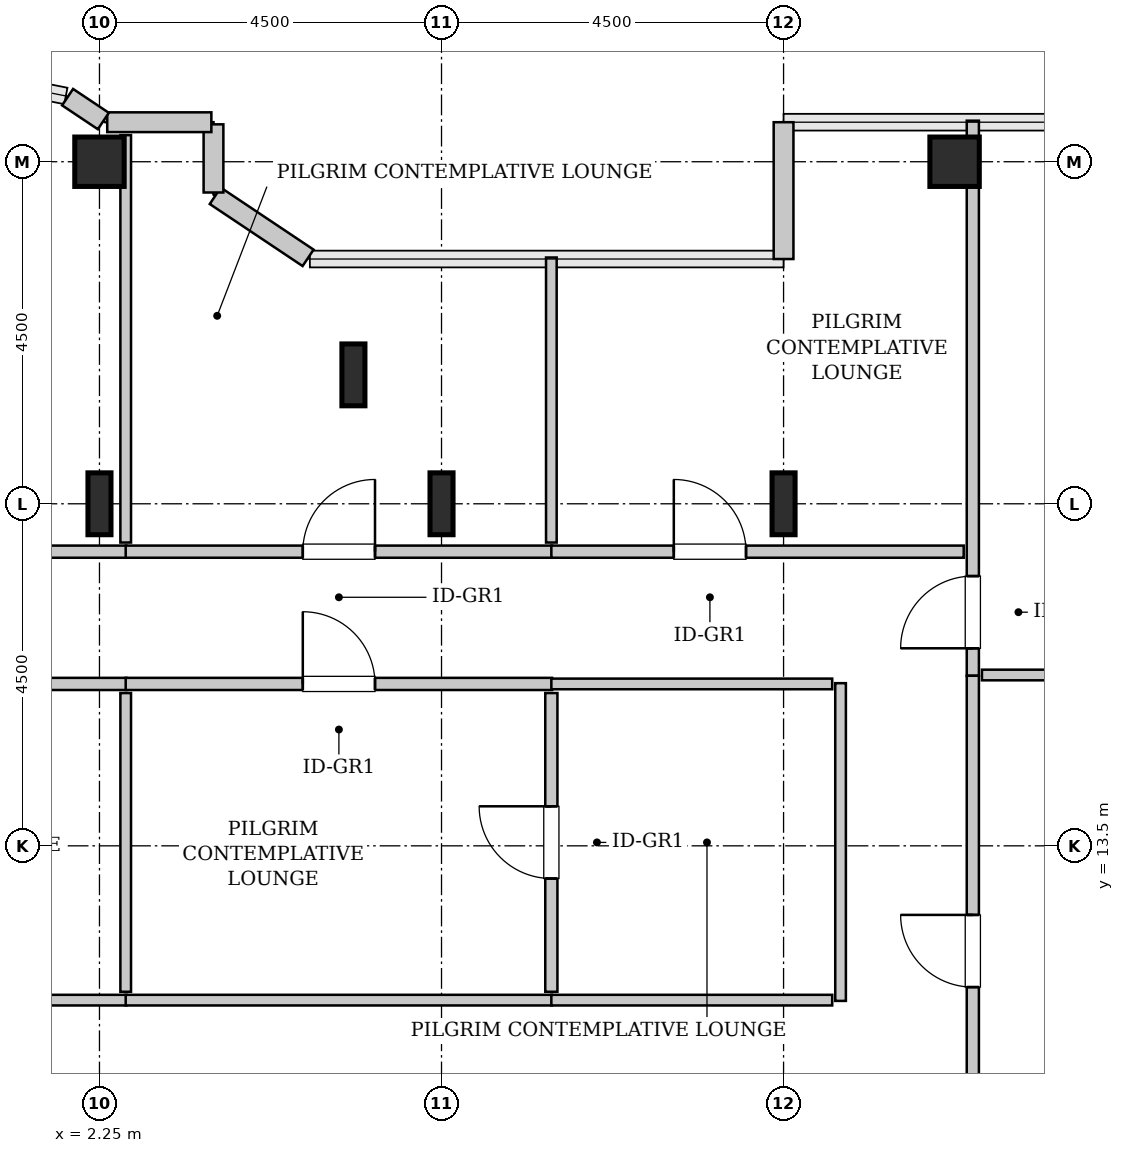
"""IFC4 building model, lengths in metres.
Left out: names, types, materials, properties, quantities, classifications, styles, units other than length and angle.
Written with IfcOpenShell. Run it as: python <this file> out.ifc"""

import sys

from ifc_helpers import new_model, si_unit, direction, frame, frame_2d, origin, origin_2d, place, context, subcontext, project, spatial, rectangle, hollow_rectangle, i_section, extrude, source, transform, mapped, element, fill, save


model = new_model("IFC4")
c1 = context("Model", 3, precision=1e-05, world=origin(), true_north=direction((0.0, 1.0)))
c2 = subcontext(c1, "Body", "Model", "MODEL_VIEW")
j1 = project(units=[si_unit("LENGTHUNIT", "METRE"), si_unit("PLANEANGLEUNIT", "RADIAN")], contexts=[c1])
p1 = place(None, origin())
s1 = spatial("IfcSite", under=j1, at=p1, CompositionType="ELEMENT")
p2 = place(p1, origin())
s2 = spatial("IfcBuilding", under=s1, at=p2, CompositionType="ELEMENT")
p3 = place(p2, frame((0.0, 0.0, 252.2)))
s3 = spatial("IfcBuildingStorey", under=s2, at=p3, CompositionType="ELEMENT", Elevation=252.2)
m1 = source(origin(), c2, "Body", "SweptSolid", [
    extrude(i_section(OverallWidth=0.303, OverallDepth=0.814, WebThickness=0.021, FlangeThickness=0.04, FilletRadius=0.03, at=origin_2d()), origin(), (0.0, 0.0, 1.0), 3.8),
])
p4 = place(p3, frame((2.25, 18.0, 0.0), z_axis=(0.0, 0.0, 1.0), x_axis=(1.0, 0.0, 0.0)))
e1 = element("IfcColumn", 1, at=p4, inside=s3, PredefinedType="COLUMN", context=c2, shape_type="MappedRepresentation", body=[
    mapped(m1, transform((0.0, 0.0, 0.0), x_axis=(1.0, 0.0, 0.0), y_axis=(0.0, 1.0, 0.0), z_axis=(0.0, 0.0, 1.0), scale=1.0)),
])
m2 = source(origin(), c2, "Body", "SweptSolid", [
    extrude(hollow_rectangle(XDim=0.65, YDim=0.65, WallThickness=0.032, InnerFilletRadius=0.032, OuterFilletRadius=0.064, at=origin_2d()), origin(), (0.0, 0.0, 1.0), 3.8),
])
p5 = place(p3, frame((2.25, 22.5, 0.0), z_axis=(0.0, 0.0, 1.0), x_axis=(1.0, 0.0, 0.0)))
e2 = element("IfcColumn", 2, at=p5, inside=s3, PredefinedType="COLUMN", context=c2, shape_type="MappedRepresentation", body=[
    mapped(m2, transform((0.0, 0.0, 0.0), x_axis=(1.0, 0.0, 0.0), y_axis=(0.0, 1.0, 0.0), z_axis=(0.0, 0.0, 1.0), scale=1.0)),
])
for number, where, z_axis, x_axis in (
    (3, (5.591, 19.696, 0.0), (0.0, 0.0, 1.0), (1.0, 0.0, 0.0)),
    (4, (6.75, 18.0, 0.0), (0.0, 0.0, 1.0), (1.0, 0.0, 0.0)),
    (5, (11.25, 18.0, 0.0), (0.0, 0.0, 1.0), (1.0, 0.0, 0.0)),
):
    element("IfcColumn", number, at=place(p3, frame(where, z_axis=z_axis, x_axis=x_axis)), inside=s3, PredefinedType="COLUMN", context=c2, shape_type="MappedRepresentation", body=[
        mapped(m1, transform((0.0, 0.0, 0.0), x_axis=(1.0, 0.0, 0.0), y_axis=(0.0, 1.0, 0.0), z_axis=(0.0, 0.0, 1.0), scale=1.0)),
    ])
p6 = place(p3, frame((13.5, 22.5, 0.0), z_axis=(0.0, 0.0, 1.0), x_axis=(1.0, 0.0, 0.0)))
e6 = element("IfcColumn", 6, at=p6, inside=s3, PredefinedType="COLUMN", context=c2, shape_type="MappedRepresentation", body=[
    mapped(m2, transform((0.0, 0.0, 0.0), x_axis=(1.0, 0.0, 0.0), y_axis=(0.0, 1.0, 0.0), z_axis=(0.0, 0.0, 1.0), scale=1.0)),
])
m3 = source(origin(), c2, "Body", "SweptSolid", [
    extrude(rectangle(XDim=1.8, YDim=0.26, at=frame_2d((0.9, 0.0))), origin(), (0.0, 0.0, 1.0), 3.55),
])
p7 = place(p3, frame((11.25, 23.02, 0.0), z_axis=(0.0, 0.0, 1.0), x_axis=(0.0, -1.0, 0.0)))
e7 = element("IfcWall", 7, at=p7, inside=s3, PredefinedType="SOLIDWALL", context=c2, shape_type="MappedRepresentation", body=[
    mapped(m3, transform((0.0, 0.0, 0.0), x_axis=(1.0, 0.0, 0.0), y_axis=(0.0, 1.0, 0.0), z_axis=(0.0, 0.0, 1.0), scale=1.0)),
])
m4 = source(origin(), c2, "Body", "SweptSolid", [
    extrude(rectangle(XDim=1.469, YDim=0.26, at=frame_2d((0.734, 0.0))), origin(), (0.0, 0.0, 1.0), 3.55),
])
p8 = place(p3, frame((4.995, 21.236, 0.0), z_axis=(0.0, 0.0, 1.0), x_axis=(-0.831461760506, 0.555581983884, 0.0)))
e8 = element("IfcWall", 8, at=p8, inside=s3, PredefinedType="SOLIDWALL", context=c2, shape_type="MappedRepresentation", body=[
    mapped(m4, transform((0.0, 0.0, 0.0), x_axis=(1.0, 0.0, 0.0), y_axis=(0.0, 1.0, 0.0), z_axis=(0.0, 0.0, 1.0), scale=1.0)),
])
m5 = source(origin(), c2, "Body", "SweptSolid", [
    extrude(rectangle(XDim=0.897, YDim=0.26, at=frame_2d((0.448, 0.0))), origin(), (0.0, 0.0, 1.0), 3.55),
])
p9 = place(p3, frame((3.75, 22.095, 0.0), z_axis=(0.0, 0.0, 1.0), x_axis=(0.0, 1.0, 0.0)))
e9 = element("IfcWall", 9, at=p9, inside=s3, PredefinedType="SOLIDWALL", context=c2, shape_type="MappedRepresentation", body=[
    mapped(m5, transform((0.0, 0.0, 0.0), x_axis=(1.0, 0.0, 0.0), y_axis=(0.0, 1.0, 0.0), z_axis=(0.0, 0.0, 1.0), scale=1.0)),
])
m6 = source(origin(), c2, "Body", "SweptSolid", [
    extrude(rectangle(XDim=1.37, YDim=0.26, at=frame_2d((0.685, 0.0))), origin(), (0.0, 0.0, 1.0), 3.55),
])
p10 = place(p3, frame((3.722, 23.02, 0.0), z_axis=(0.0, 0.0, 1.0), x_axis=(-1.0, 0.0, 0.0)))
e10 = element("IfcWall", 10, at=p10, inside=s3, PredefinedType="SOLIDWALL", context=c2, shape_type="MappedRepresentation", body=[
    mapped(m6, transform((0.0, 0.0, 0.0), x_axis=(1.0, 0.0, 0.0), y_axis=(0.0, 1.0, 0.0), z_axis=(0.0, 0.0, 1.0), scale=1.0)),
])
m7 = source(origin(), c2, "Body", "SweptSolid", [
    extrude(rectangle(XDim=0.565, YDim=0.26, at=frame_2d((0.283, 0.0))), origin(), (0.0, 0.0, 1.0), 3.55),
])
p11 = place(p3, frame((2.301, 23.036, 0.0), z_axis=(0.0, 0.0, 1.0), x_axis=(-0.831651492666, 0.555297933317, 0.0)))
e11 = element("IfcWall", 11, at=p11, inside=s3, PredefinedType="SOLIDWALL", context=c2, shape_type="MappedRepresentation", body=[
    mapped(m7, transform((0.0, 0.0, 0.0), x_axis=(1.0, 0.0, 0.0), y_axis=(0.0, 1.0, 0.0), z_axis=(0.0, 0.0, 1.0), scale=1.0)),
])
m8 = source(origin(), c2, "Body", "SweptSolid", [
    extrude(rectangle(XDim=7.302, YDim=0.16, at=frame_2d((3.651, 0.0))), origin(), (0.0, 0.0, 1.0), 3.535),
])
p12 = place(p3, frame((13.74, 15.738, 0.0), z_axis=(0.0, 0.0, 1.0), x_axis=(0.0, 1.0, 0.0)))
e12 = element("IfcWall", 12, at=p12, inside=s3, PredefinedType="PARTITIONING", context=c2, shape_type="MappedRepresentation", body=[
    mapped(m8, transform((0.0, 0.0, 0.0), x_axis=(1.0, 0.0, 0.0), y_axis=(0.0, 1.0, 0.0), z_axis=(0.0, 0.0, 1.0), scale=1.0)),
])
p13 = place(p12, frame((0.361, 0.0, 0.0)))
e13 = element("IfcOpeningElement", 13, at=p13, cuts=e12, PredefinedType="OPENING", context=c2, shape_type="SweptSolid", body=[
    extrude(rectangle(XDim=0.95, YDim=2.1, at=frame_2d((0.475, 1.05))), frame((0.0, 0.09, 0.0), z_axis=(0.0, -1.0, 0.0), x_axis=(1.0, 0.0, 0.0)), (0.0, 0.0, 1.0), 0.18),
])
m9 = source(origin(), c2, "Body", "SweptSolid", [
    extrude(rectangle(XDim=11.43, YDim=0.14, at=frame_2d((5.715, 0.0))), origin(), (0.0, 0.0, 1.0), 3.535),
])
p14 = place(p3, frame((13.86, 15.748, 0.0), z_axis=(0.0, 0.0, 1.0), x_axis=(1.0, 0.0, 0.0)))
e14 = element("IfcWall", 14, at=p14, inside=s3, PredefinedType="PARTITIONING", context=c2, shape_type="MappedRepresentation", body=[
    mapped(m9, transform((0.0, 0.0, 0.0), x_axis=(1.0, 0.0, 0.0), y_axis=(0.0, 1.0, 0.0), z_axis=(0.0, 0.0, 1.0), scale=1.0)),
])
m10 = source(origin(), c2, "Body", "SweptSolid", [
    extrude(rectangle(XDim=7.242, YDim=0.16, at=frame_2d((3.621, 0.0))), origin(), (0.0, 0.0, 1.0), 3.535),
])
p15 = place(p3, frame((13.74, 8.495, 0.0), z_axis=(0.0, 0.0, 1.0), x_axis=(0.0, 1.0, 0.0)))
e15 = element("IfcWall", 15, at=p15, inside=s3, PredefinedType="PARTITIONING", context=c2, shape_type="MappedRepresentation", body=[
    mapped(m10, transform((0.0, 0.0, 0.0), x_axis=(1.0, 0.0, 0.0), y_axis=(0.0, 1.0, 0.0), z_axis=(0.0, 0.0, 1.0), scale=1.0)),
])
p16 = place(p15, frame((3.146, 0.0, 0.0)))
e16 = element("IfcOpeningElement", 16, at=p16, cuts=e15, PredefinedType="OPENING", context=c2, shape_type="SweptSolid", body=[
    extrude(rectangle(XDim=0.95, YDim=2.1, at=frame_2d((0.475, 1.05))), frame((0.0, 0.09, 0.0), z_axis=(0.0, -1.0, 0.0), x_axis=(1.0, 0.0, 0.0)), (0.0, 0.0, 1.0), 0.18),
])
m11 = source(origin(), c2, "Body", "SweptSolid", [
    extrude(rectangle(XDim=7.01, YDim=0.16, at=frame_2d((3.505, 0.0))), origin(), (0.0, 0.0, 1.0), 3.535),
])
p17 = place(p3, frame((-4.405, 17.37, 0.0), z_axis=(0.0, 0.0, 1.0), x_axis=(1.0, 0.0, 0.0)))
e17 = element("IfcWall", 17, at=p17, inside=s3, PredefinedType="PARTITIONING", context=c2, shape_type="MappedRepresentation", body=[
    mapped(m11, transform((0.0, 0.0, 0.0), x_axis=(1.0, 0.0, 0.0), y_axis=(0.0, 1.0, 0.0), z_axis=(0.0, 0.0, 1.0), scale=1.0)),
])
p18 = place(p17, frame((3.03, 0.0, 0.0)))
e18 = element("IfcOpeningElement", 18, at=p18, cuts=e17, PredefinedType="OPENING", context=c2, shape_type="SweptSolid", body=[
    extrude(rectangle(XDim=0.95, YDim=2.1, at=frame_2d((0.475, 1.05))), frame((0.0, 0.09, 0.0), z_axis=(0.0, -1.0, 0.0), x_axis=(1.0, 0.0, 0.0)), (0.0, 0.0, 1.0), 0.18),
])
m12 = source(origin(), c2, "Body", "SweptSolid", [
    extrude(rectangle(XDim=5.36, YDim=0.14, at=frame_2d((2.68, 0.0))), origin(), (0.0, 0.0, 1.0), 2.925),
])
p19 = place(p3, frame((2.595, 17.49, 0.0), z_axis=(0.0, 0.0, 1.0), x_axis=(0.0, 1.0, 0.0)))
e19 = element("IfcWall", 19, at=p19, inside=s3, PredefinedType="PARTITIONING", context=c2, shape_type="MappedRepresentation", body=[
    mapped(m12, transform((0.0, 0.0, 0.0), x_axis=(1.0, 0.0, 0.0), y_axis=(0.0, 1.0, 0.0), z_axis=(0.0, 0.0, 1.0), scale=1.0)),
])
p20 = place(p3, frame((-4.405, 15.63, 0.0), z_axis=(0.0, 0.0, 1.0), x_axis=(1.0, 0.0, 0.0)))
e20 = element("IfcWall", 20, at=p20, inside=s3, PredefinedType="PARTITIONING", context=c2, shape_type="MappedRepresentation", body=[
    mapped(m11, transform((0.0, 0.0, 0.0), x_axis=(1.0, 0.0, 0.0), y_axis=(0.0, 1.0, 0.0), z_axis=(0.0, 0.0, 1.0), scale=1.0)),
])
p21 = place(p20, frame((3.03, 0.0, 0.0)))
e21 = element("IfcOpeningElement", 21, at=p21, cuts=e20, PredefinedType="OPENING", context=c2, shape_type="SweptSolid", body=[
    extrude(rectangle(XDim=0.95, YDim=2.1, at=frame_2d((0.475, 1.05))), frame((0.0, 0.09, 0.0), z_axis=(0.0, -1.0, 0.0), x_axis=(1.0, 0.0, 0.0)), (0.0, 0.0, 1.0), 0.18),
])
m13 = source(origin(), c2, "Body", "SweptSolid", [
    extrude(rectangle(XDim=7.01, YDim=0.14, at=frame_2d((3.505, 0.0))), origin(), (0.0, 0.0, 1.0), 3.535),
])
p22 = place(p3, frame((-4.405, 11.47, 0.0), z_axis=(0.0, 0.0, 1.0), x_axis=(1.0, 0.0, 0.0)))
e22 = element("IfcWall", 22, at=p22, inside=s3, PredefinedType="PARTITIONING", context=c2, shape_type="MappedRepresentation", body=[
    mapped(m13, transform((0.0, 0.0, 0.0), x_axis=(1.0, 0.0, 0.0), y_axis=(0.0, 1.0, 0.0), z_axis=(0.0, 0.0, 1.0), scale=1.0)),
])
m14 = source(origin(), c2, "Body", "SweptSolid", [
    extrude(rectangle(XDim=3.93, YDim=0.14, at=frame_2d((1.965, 0.0))), origin(), (0.0, 0.0, 1.0), 3.535),
])
p23 = place(p3, frame((2.595, 11.58, 0.0), z_axis=(0.0, 0.0, 1.0), x_axis=(0.0, 1.0, 0.0)))
e23 = element("IfcWall", 23, at=p23, inside=s3, PredefinedType="PARTITIONING", context=c2, shape_type="MappedRepresentation", body=[
    mapped(m14, transform((0.0, 0.0, 0.0), x_axis=(1.0, 0.0, 0.0), y_axis=(0.0, 1.0, 0.0), z_axis=(0.0, 0.0, 1.0), scale=1.0)),
])
m15 = source(origin(), c2, "Body", "SweptSolid", [
    extrude(rectangle(XDim=5.61, YDim=0.16, at=frame_2d((2.805, 0.0))), origin(), (0.0, 0.0, 1.0), 3.535),
])
p24 = place(p3, frame((2.595, 17.37, 0.0), z_axis=(0.0, 0.0, 1.0), x_axis=(1.0, 0.0, 0.0)))
e24 = element("IfcWall", 24, at=p24, inside=s3, PredefinedType="PARTITIONING", context=c2, shape_type="MappedRepresentation", body=[
    mapped(m15, transform((0.0, 0.0, 0.0), x_axis=(1.0, 0.0, 0.0), y_axis=(0.0, 1.0, 0.0), z_axis=(0.0, 0.0, 1.0), scale=1.0)),
])
p25 = place(p24, frame((2.33, 0.0, 0.0)))
e25 = element("IfcOpeningElement", 25, at=p25, cuts=e24, PredefinedType="OPENING", context=c2, shape_type="SweptSolid", body=[
    extrude(rectangle(XDim=0.95, YDim=2.1, at=frame_2d((0.475, 1.05))), frame((0.0, 0.09, 0.0), z_axis=(0.0, -1.0, 0.0), x_axis=(1.0, 0.0, 0.0)), (0.0, 0.0, 1.0), 0.18),
])
m16 = source(origin(), c2, "Body", "SweptSolid", [
    extrude(rectangle(XDim=3.75, YDim=0.14, at=frame_2d((1.875, 0.0))), origin(), (0.0, 0.0, 1.0), 3.535),
])
p26 = place(p3, frame((8.195, 17.49, 0.0), z_axis=(0.0, 0.0, 1.0), x_axis=(0.0, 1.0, 0.0)))
e26 = element("IfcWall", 26, at=p26, inside=s3, PredefinedType="PARTITIONING", context=c2, shape_type="MappedRepresentation", body=[
    mapped(m16, transform((0.0, 0.0, 0.0), x_axis=(1.0, 0.0, 0.0), y_axis=(0.0, 1.0, 0.0), z_axis=(0.0, 0.0, 1.0), scale=1.0)),
])
p27 = place(p3, frame((2.595, 15.63, 0.0), z_axis=(0.0, 0.0, 1.0), x_axis=(1.0, 0.0, 0.0)))
e27 = element("IfcWall", 27, at=p27, inside=s3, PredefinedType="PARTITIONING", context=c2, shape_type="MappedRepresentation", body=[
    mapped(m15, transform((0.0, 0.0, 0.0), x_axis=(1.0, 0.0, 0.0), y_axis=(0.0, 1.0, 0.0), z_axis=(0.0, 0.0, 1.0), scale=1.0)),
])
p28 = place(p27, frame((2.33, 0.0, 0.0)))
e28 = element("IfcOpeningElement", 28, at=p28, cuts=e27, PredefinedType="OPENING", context=c2, shape_type="SweptSolid", body=[
    extrude(rectangle(XDim=0.95, YDim=2.1, at=frame_2d((0.475, 1.05))), frame((0.0, 0.09, 0.0), z_axis=(0.0, -1.0, 0.0), x_axis=(1.0, 0.0, 0.0)), (0.0, 0.0, 1.0), 0.18),
])
m17 = source(origin(), c2, "Body", "SweptSolid", [
    extrude(rectangle(XDim=5.61, YDim=0.14, at=frame_2d((2.805, 0.0))), origin(), (0.0, 0.0, 1.0), 3.535),
])
p29 = place(p3, frame((2.595, 11.47, 0.0), z_axis=(0.0, 0.0, 1.0), x_axis=(1.0, 0.0, 0.0)))
e29 = element("IfcWall", 29, at=p29, inside=s3, PredefinedType="PARTITIONING", context=c2, shape_type="MappedRepresentation", body=[
    mapped(m17, transform((0.0, 0.0, 0.0), x_axis=(1.0, 0.0, 0.0), y_axis=(0.0, 1.0, 0.0), z_axis=(0.0, 0.0, 1.0), scale=1.0)),
])
m18 = source(origin(), c2, "Body", "SweptSolid", [
    extrude(rectangle(XDim=3.93, YDim=0.16, at=frame_2d((1.965, 0.0))), origin(), (0.0, 0.0, 1.0), 3.535),
])
p30 = place(p3, frame((8.195, 11.58, 0.0), z_axis=(0.0, 0.0, 1.0), x_axis=(0.0, 1.0, 0.0)))
e30 = element("IfcWall", 30, at=p30, inside=s3, PredefinedType="PARTITIONING", context=c2, shape_type="MappedRepresentation", body=[
    mapped(m18, transform((0.0, 0.0, 0.0), x_axis=(1.0, 0.0, 0.0), y_axis=(0.0, 1.0, 0.0), z_axis=(0.0, 0.0, 1.0), scale=1.0)),
])
p31 = place(p30, frame((1.49, 0.0, 0.0)))
e31 = element("IfcOpeningElement", 31, at=p31, cuts=e30, PredefinedType="OPENING", context=c2, shape_type="SweptSolid", body=[
    extrude(rectangle(XDim=0.95, YDim=2.1, at=frame_2d((0.475, 1.05))), frame((0.0, 0.09, 0.0), z_axis=(0.0, -1.0, 0.0), x_axis=(1.0, 0.0, 0.0)), (0.0, 0.0, 1.0), 0.18),
])
m19 = source(origin(), c2, "Body", "SweptSolid", [
    extrude(rectangle(XDim=5.425, YDim=0.16, at=frame_2d((2.712, 0.0))), origin(), (0.0, 0.0, 1.0), 3.535),
])
p32 = place(p3, frame((8.195, 17.37, 0.0), z_axis=(0.0, 0.0, 1.0), x_axis=(1.0, 0.0, 0.0)))
e32 = element("IfcWall", 32, at=p32, inside=s3, PredefinedType="PARTITIONING", context=c2, shape_type="MappedRepresentation", body=[
    mapped(m19, transform((0.0, 0.0, 0.0), x_axis=(1.0, 0.0, 0.0), y_axis=(0.0, 1.0, 0.0), z_axis=(0.0, 0.0, 1.0), scale=1.0)),
])
p33 = place(p32, frame((1.611, 0.0, 0.0)))
e33 = element("IfcOpeningElement", 33, at=p33, cuts=e32, PredefinedType="OPENING", context=c2, shape_type="SweptSolid", body=[
    extrude(rectangle(XDim=0.95, YDim=2.1, at=frame_2d((0.475, 1.05))), frame((0.0, 0.09, 0.0), z_axis=(0.0, -1.0, 0.0), x_axis=(1.0, 0.0, 0.0)), (0.0, 0.0, 1.0), 0.18),
])
m20 = source(origin(), c2, "Body", "SweptSolid", [
    extrude(rectangle(XDim=4.18, YDim=0.14, at=frame_2d((2.09, 0.0))), origin(), (0.0, 0.0, 1.0), 3.535),
])
p34 = place(p3, frame((12.0, 11.46, 0.0), z_axis=(0.0, 0.0, 1.0), x_axis=(0.0, 1.0, 0.0)))
e34 = element("IfcWall", 34, at=p34, inside=s3, PredefinedType="PARTITIONING", context=c2, shape_type="MappedRepresentation", body=[
    mapped(m20, transform((0.0, 0.0, 0.0), x_axis=(1.0, 0.0, 0.0), y_axis=(0.0, 1.0, 0.0), z_axis=(0.0, 0.0, 1.0), scale=1.0)),
])
m21 = source(origin(), c2, "Body", "SweptSolid", [
    extrude(rectangle(XDim=3.695, YDim=0.14, at=frame_2d((1.847, 0.0))), origin(), (0.0, 0.0, 1.0), 3.535),
])
for number, where, z_axis, x_axis in (
    (35, (8.195, 15.63, 0.0), (0.0, 0.0, 1.0), (1.0, 0.0, 0.0)),
    (36, (8.195, 11.47, 0.0), (0.0, 0.0, 1.0), (1.0, 0.0, 0.0)),
):
    element("IfcWall", number, at=place(p3, frame(where, z_axis=z_axis, x_axis=x_axis)), inside=s3, PredefinedType="PARTITIONING", context=c2, shape_type="MappedRepresentation", body=[
        mapped(m21, transform((0.0, 0.0, 0.0), x_axis=(1.0, 0.0, 0.0), y_axis=(0.0, 1.0, 0.0), z_axis=(0.0, 0.0, 1.0), scale=1.0)),
    ])
m22 = source(origin(), c2, "Body", "SweptSolid", [
    extrude(rectangle(XDim=0.95, YDim=2.1, at=frame_2d((0.475, 1.05))), frame((0.0, 0.025, 0.0), z_axis=(0.0, -1.0, 0.0), x_axis=(1.0, 0.0, 0.0)), (0.0, 0.0, 1.0), 0.05),
])
p35 = place(p13, origin())
e37 = element("IfcDoor", 37, at=p35, inside=s3, OperationType="SINGLE_SWING_LEFT", PredefinedType="DOOR", context=c2, shape_type="MappedRepresentation", body=[
    mapped(m22, transform((0.0, 0.0, 0.0), x_axis=(1.0, 0.0, 0.0), y_axis=(0.0, 1.0, 0.0), z_axis=(0.0, 0.0, 1.0), scale=1.0)),
])
fill(e13, e37)
p36 = place(p16, origin())
e38 = element("IfcDoor", 38, at=p36, inside=s3, OperationType="SINGLE_SWING_RIGHT", PredefinedType="DOOR", context=c2, shape_type="MappedRepresentation", body=[
    mapped(m22, transform((0.0, 0.0, 0.0), x_axis=(1.0, 0.0, 0.0), y_axis=(0.0, 1.0, 0.0), z_axis=(0.0, 0.0, 1.0), scale=1.0)),
])
fill(e16, e38)
p37 = place(p25, origin())
e39 = element("IfcDoor", 39, at=p37, inside=s3, OperationType="SINGLE_SWING_RIGHT", PredefinedType="DOOR", context=c2, shape_type="MappedRepresentation", body=[
    mapped(m22, transform((0.0, 0.0, 0.0), x_axis=(1.0, 0.0, 0.0), y_axis=(0.0, 1.0, 0.0), z_axis=(0.0, 0.0, 1.0), scale=1.0)),
])
fill(e25, e39)
p38 = place(p28, origin())
e40 = element("IfcDoor", 40, at=p38, inside=s3, OperationType="SINGLE_SWING_LEFT", PredefinedType="DOOR", context=c2, shape_type="MappedRepresentation", body=[
    mapped(m22, transform((0.0, 0.0, 0.0), x_axis=(1.0, 0.0, 0.0), y_axis=(0.0, 1.0, 0.0), z_axis=(0.0, 0.0, 1.0), scale=1.0)),
])
fill(e28, e40)
p39 = place(p31, origin())
e41 = element("IfcDoor", 41, at=p39, inside=s3, OperationType="SINGLE_SWING_RIGHT", PredefinedType="DOOR", context=c2, shape_type="MappedRepresentation", body=[
    mapped(m22, transform((0.0, 0.0, 0.0), x_axis=(1.0, 0.0, 0.0), y_axis=(0.0, 1.0, 0.0), z_axis=(0.0, 0.0, 1.0), scale=1.0)),
])
fill(e31, e41)
p40 = place(p33, origin())
e42 = element("IfcDoor", 42, at=p40, inside=s3, OperationType="SINGLE_SWING_LEFT", PredefinedType="DOOR", context=c2, shape_type="MappedRepresentation", body=[
    mapped(m22, transform((0.0, 0.0, 0.0), x_axis=(1.0, 0.0, 0.0), y_axis=(0.0, 1.0, 0.0), z_axis=(0.0, 0.0, 1.0), scale=1.0)),
])
fill(e33, e42)
save(model, sys.argv[1])
